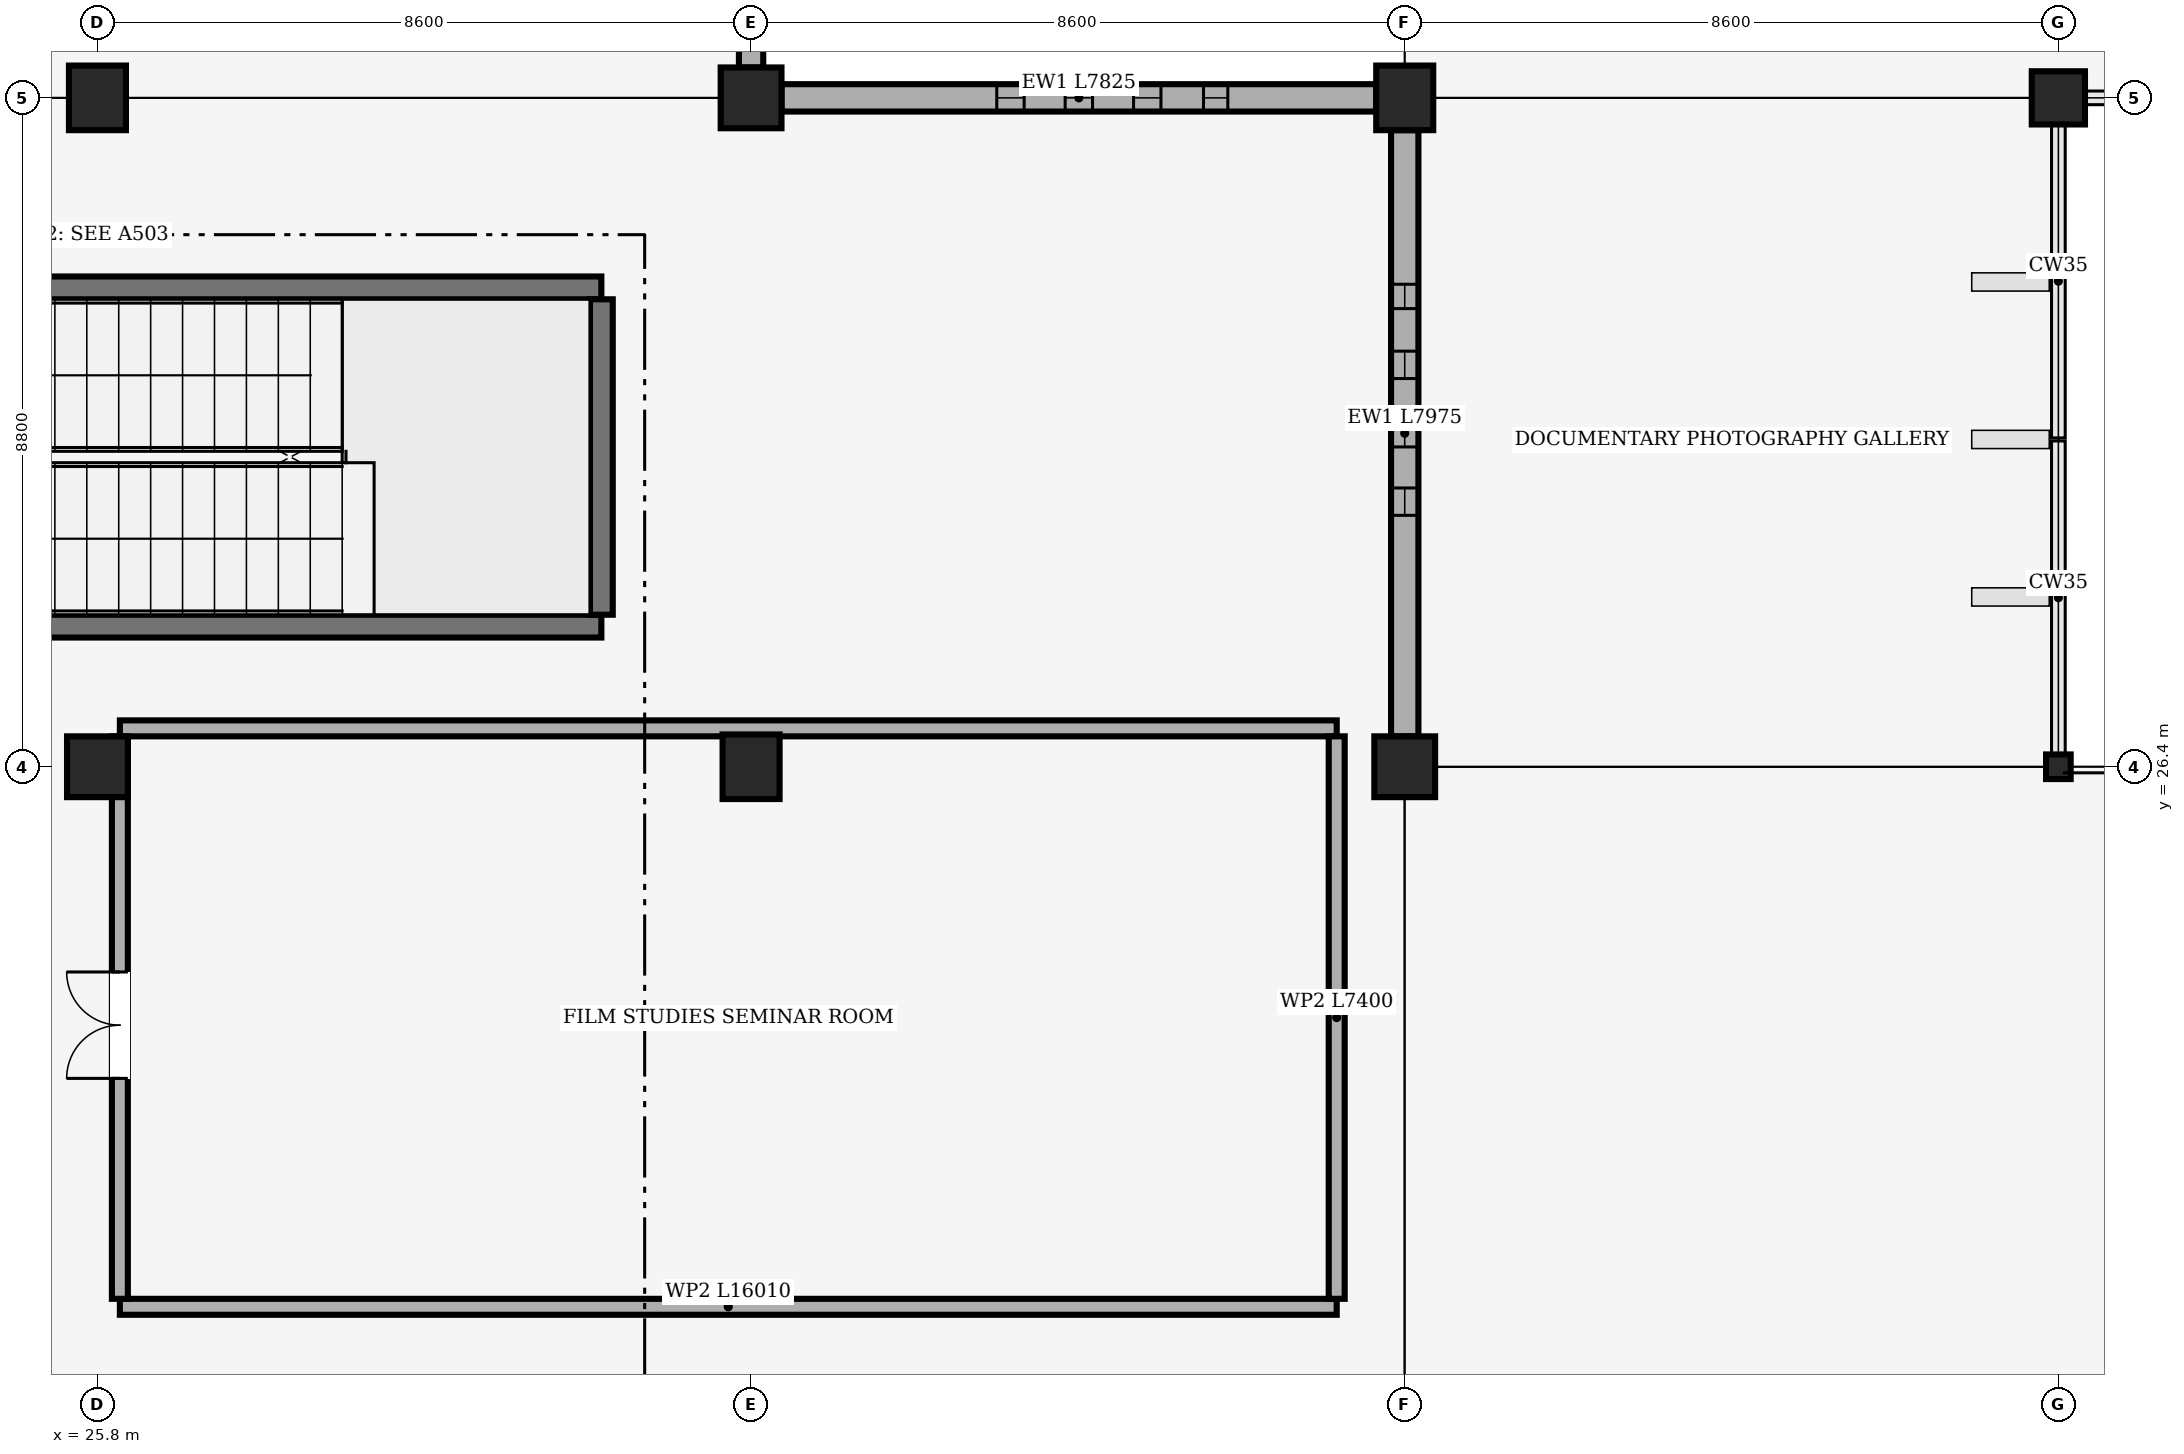
"""IFC4 building model, lengths in metres.
Left out: names, types, materials, properties, quantities, classifications, styles, units other than length and angle.
Written with IfcOpenShell. Run it as: python <this file> out.ifc"""

import sys

from ifc_helpers import new_model, si_unit, direction, frame, frame_2d, origin, origin_2d, place, context, subcontext, project, spatial, rectangle, hollow_circle, extrude, element, fill, save


model = new_model("IFC4")
c1 = context("Model", 3, precision=1e-05, world=origin(), true_north=direction((0.0, 1.0)))
c2 = subcontext(c1, "Body", "Model", "MODEL_VIEW")
j1 = project(units=[si_unit("LENGTHUNIT", "METRE"), si_unit("PLANEANGLEUNIT", "RADIAN")], contexts=[c1])
p1 = place(None, origin())
s1 = spatial("IfcSite", under=j1, at=p1, CompositionType="ELEMENT")
p2 = place(p1, origin())
s2 = spatial("IfcBuilding", under=s1, at=p2, CompositionType="ELEMENT")
p3 = place(p2, frame((0.0, 0.0, 8.4)))
s3 = spatial("IfcBuildingStorey", under=s2, at=p3, CompositionType="ELEMENT", Elevation=8.4)
p4 = place(p3, frame((25.8, 26.4, 0.0), z_axis=(0.0, 0.0, 1.0), x_axis=(1.0, 0.0, 0.0)))
e1 = element("IfcColumn", 1, at=p4, inside=s3, PredefinedType="COLUMN", context=c2, shape_type="SweptSolid", body=[
    extrude(rectangle(XDim=0.8, YDim=0.8, at=origin_2d()), origin(), (0.0, 0.0, 1.0), 3.34),
])
for number, where, z_axis, x_axis in (
    (2, (25.8, 35.2, 0.0), (0.0, 0.0, 1.0), (1.0, 0.0, 0.0)),
    (3, (34.4, 26.4, 0.0), (0.0, 0.0, 1.0), (1.0, 0.0, 0.0)),
):
    element("IfcColumn", number, at=place(p3, frame(where, z_axis=z_axis, x_axis=x_axis)), inside=s3, PredefinedType="COLUMN", context=c2, shape_type="SweptSolid", body=[
        extrude(rectangle(XDim=0.75, YDim=0.85, at=origin_2d()), origin(), (0.0, 0.0, 1.0), 3.34),
    ])
for number, where, z_axis, x_axis in (
    (4, (34.4, 35.2, 0.0), (0.0, 0.0, 1.0), (1.0, 0.0, 0.0)),
    (5, (43.0, 26.4, 0.0), (0.0, 0.0, 1.0), (1.0, 0.0, 0.0)),
):
    element("IfcColumn", number, at=place(p3, frame(where, z_axis=z_axis, x_axis=x_axis)), inside=s3, PredefinedType="COLUMN", context=c2, shape_type="SweptSolid", body=[
        extrude(rectangle(XDim=0.8, YDim=0.8, at=origin_2d()), origin(), (0.0, 0.0, 1.0), 3.34),
    ])
p5 = place(p3, frame((43.0, 35.2, 0.0), z_axis=(0.0, 0.0, 1.0), x_axis=(1.0, 0.0, 0.0)))
e6 = element("IfcColumn", 6, at=p5, inside=s3, PredefinedType="COLUMN", context=c2, shape_type="SweptSolid", body=[
    extrude(rectangle(XDim=0.75, YDim=0.85, at=origin_2d()), origin(), (0.0, 0.0, 1.0), 3.34),
])
p6 = place(p3, frame((51.6, 26.4, 0.0), z_axis=(0.0, 0.0, 1.0), x_axis=(1.0, 0.0, 0.0)))
e7 = element("IfcColumn", 7, at=p6, inside=s3, PredefinedType="COLUMN", context=c2, shape_type="SweptSolid", body=[
    extrude(hollow_circle(Radius=0.162, WallThickness=0.01, at=origin_2d()), origin(), (0.0, 0.0, 1.0), 3.34),
])
p7 = place(p3, frame((51.6, 35.2, 0.0), z_axis=(0.0, 0.0, 1.0), x_axis=(1.0, 0.0, 0.0)))
e8 = element("IfcColumn", 8, at=p7, inside=s3, PredefinedType="COLUMN", context=c2, shape_type="SweptSolid", body=[
    extrude(rectangle(XDim=0.7, YDim=0.7, at=origin_2d()), origin(), (0.0, 0.0, 1.0), 3.34),
])
p8 = place(p3, frame((43.0, 26.8, 0.0), z_axis=(0.0, 0.0, 1.0), x_axis=(0.0, 1.0, 0.0)))
e9 = element("IfcWall", 9, at=p8, inside=s3, PredefinedType="SOLIDWALL", context=c2, shape_type="SweptSolid", body=[
    extrude(rectangle(XDim=7.975, YDim=0.36, at=frame_2d((3.987, 0.0))), origin(), (0.0, 0.0, 1.0), 2.675),
])
p9 = place(p8, frame((2.907, 0.0, 1.32)))
e10 = element("IfcOpeningElement", 10, at=p9, cuts=e9, PredefinedType="OPENING", context=c2, shape_type="SweptSolid", body=[
    extrude(rectangle(XDim=0.36, YDim=0.36, at=frame_2d((0.18, 0.18))), frame((0.0, 0.18, 0.0), z_axis=(0.0, -1.0, 0.0), x_axis=(1.0, 0.0, 0.0)), (0.0, 0.0, 1.0), 0.36),
])
p10 = place(p8, frame((3.808, 0.0, 0.42)))
e11 = element("IfcOpeningElement", 11, at=p10, cuts=e9, PredefinedType="OPENING", context=c2, shape_type="SweptSolid", body=[
    extrude(rectangle(XDim=0.36, YDim=0.36, at=frame_2d((0.18, 0.18))), frame((0.0, 0.18, 0.0), z_axis=(0.0, -1.0, 0.0), x_axis=(1.0, 0.0, 0.0)), (0.0, 0.0, 1.0), 0.36),
])
p11 = place(p8, frame((4.708, 0.0, 1.32)))
e12 = element("IfcOpeningElement", 12, at=p11, cuts=e9, PredefinedType="OPENING", context=c2, shape_type="SweptSolid", body=[
    extrude(rectangle(XDim=0.36, YDim=0.36, at=frame_2d((0.18, 0.18))), frame((0.0, 0.18, 0.0), z_axis=(0.0, -1.0, 0.0), x_axis=(1.0, 0.0, 0.0)), (0.0, 0.0, 1.0), 0.36),
])
p12 = place(p8, frame((5.627, 0.0, 1.32)))
e13 = element("IfcOpeningElement", 13, at=p12, cuts=e9, PredefinedType="OPENING", context=c2, shape_type="SweptSolid", body=[
    extrude(rectangle(XDim=0.32, YDim=0.32, at=frame_2d((0.16, 0.16))), frame((0.0, 0.18, 0.0), z_axis=(0.0, -1.0, 0.0), x_axis=(1.0, 0.0, 0.0)), (0.0, 0.0, 1.0), 0.36),
])
p13 = place(p3, frame((34.8, 35.2, 0.0), z_axis=(0.0, 0.0, 1.0), x_axis=(1.0, 0.0, 0.0)))
e14 = element("IfcWall", 14, at=p13, inside=s3, PredefinedType="SOLIDWALL", context=c2, shape_type="SweptSolid", body=[
    extrude(rectangle(XDim=7.825, YDim=0.36, at=frame_2d((3.913, 0.0))), origin(), (0.0, 0.0, 1.0), 2.675),
])
p14 = place(p13, frame((2.833, 0.0, 1.32)))
e15 = element("IfcOpeningElement", 15, at=p14, cuts=e14, PredefinedType="OPENING", context=c2, shape_type="SweptSolid", body=[
    extrude(rectangle(XDim=0.36, YDim=0.36, at=frame_2d((0.18, 0.18))), frame((0.0, 0.18, 0.0), z_axis=(0.0, -1.0, 0.0), x_axis=(1.0, 0.0, 0.0)), (0.0, 0.0, 1.0), 0.36),
])
p15 = place(p13, frame((3.732, 0.0, 0.42)))
e16 = element("IfcOpeningElement", 16, at=p15, cuts=e14, PredefinedType="OPENING", context=c2, shape_type="SweptSolid", body=[
    extrude(rectangle(XDim=0.36, YDim=0.36, at=frame_2d((0.18, 0.18))), frame((0.0, 0.18, 0.0), z_axis=(0.0, -1.0, 0.0), x_axis=(1.0, 0.0, 0.0)), (0.0, 0.0, 1.0), 0.36),
])
p16 = place(p13, frame((4.633, 0.0, 1.32)))
e17 = element("IfcOpeningElement", 17, at=p16, cuts=e14, PredefinedType="OPENING", context=c2, shape_type="SweptSolid", body=[
    extrude(rectangle(XDim=0.36, YDim=0.36, at=frame_2d((0.18, 0.18))), frame((0.0, 0.18, 0.0), z_axis=(0.0, -1.0, 0.0), x_axis=(1.0, 0.0, 0.0)), (0.0, 0.0, 1.0), 0.36),
])
p17 = place(p13, frame((5.552, 0.0, 1.32)))
e18 = element("IfcOpeningElement", 18, at=p17, cuts=e14, PredefinedType="OPENING", context=c2, shape_type="SweptSolid", body=[
    extrude(rectangle(XDim=0.32, YDim=0.32, at=frame_2d((0.16, 0.16))), frame((0.0, 0.18, 0.0), z_axis=(0.0, -1.0, 0.0), x_axis=(1.0, 0.0, 0.0)), (0.0, 0.0, 1.0), 0.36),
])
p18 = place(p3, frame((34.4, 35.6, 0.0), z_axis=(0.0, 0.0, 1.0), x_axis=(0.0, 1.0, 0.0)))
e19 = element("IfcWall", 19, at=p18, inside=s3, PredefinedType="SOLIDWALL", context=c2, shape_type="SweptSolid", body=[
    extrude(rectangle(XDim=8.025, YDim=0.32, at=frame_2d((4.012, 0.0))), origin(), (0.0, 0.0, 1.0), 2.675),
])
for number, where, z_axis, x_axis in (
    (20, (32.43, 28.25, 0.0), (0.0, 0.0, 1.0), (-1.0, 0.0, 0.0)),
    (21, (22.25, 32.7, 0.0), (0.0, 0.0, 1.0), (1.0, 0.0, 0.0)),
):
    element("IfcWall", number, at=place(p3, frame(where, z_axis=z_axis, x_axis=x_axis)), inside=s3, PredefinedType="SHEAR", context=c2, shape_type="SweptSolid", body=[
        extrude(rectangle(XDim=10.18, YDim=0.3, at=frame_2d((5.09, 0.0))), origin(), (0.0, 0.0, 1.0), 3.34),
    ])
p19 = place(p3, frame((32.43, 32.55, 0.0), z_axis=(0.0, 0.0, 1.0), x_axis=(0.0, -1.0, 0.0)))
e22 = element("IfcWall", 22, at=p19, inside=s3, PredefinedType="SHEAR", context=c2, shape_type="SweptSolid", body=[
    extrude(rectangle(XDim=4.15, YDim=0.3, at=frame_2d((2.075, 0.0))), origin(), (0.0, 0.0, 1.0), 3.34),
])
p20 = place(p3, frame((42.105, 19.295, 0.0), z_axis=(0.0, 0.0, 1.0), x_axis=(-1.0, 0.0, 0.0)))
e23 = element("IfcWall", 23, at=p20, inside=s3, PredefinedType="PARTITIONING", context=c2, shape_type="SweptSolid", body=[
    extrude(rectangle(XDim=16.01, YDim=0.21, at=frame_2d((8.005, 0.0))), origin(), (0.0, 0.0, 1.0), 3.32),
])
p21 = place(p3, frame((26.095, 19.4, 0.0), z_axis=(0.0, 0.0, 1.0), x_axis=(0.0, 1.0, 0.0)))
e24 = element("IfcWall", 24, at=p21, inside=s3, PredefinedType="PARTITIONING", context=c2, shape_type="SweptSolid", body=[
    extrude(rectangle(XDim=7.4, YDim=0.21, at=frame_2d((3.7, 0.0))), origin(), (0.0, 0.0, 1.0), 2.67),
])
p22 = place(p21, frame((2.9, 0.0, 0.0)))
e25 = element("IfcOpeningElement", 25, at=p22, cuts=e24, PredefinedType="OPENING", context=c2, shape_type="SweptSolid", body=[
    extrude(rectangle(XDim=1.4, YDim=2.15, at=frame_2d((0.7, 1.075))), frame((0.0, 0.105, 0.0), z_axis=(0.0, -1.0, 0.0), x_axis=(1.0, 0.0, 0.0)), (0.0, 0.0, 1.0), 0.21),
])
p23 = place(p3, frame((26.095, 26.905, 0.0), z_axis=(0.0, 0.0, 1.0), x_axis=(1.0, 0.0, 0.0)))
e26 = element("IfcWall", 26, at=p23, inside=s3, PredefinedType="PARTITIONING", context=c2, shape_type="SweptSolid", body=[
    extrude(rectangle(XDim=16.01, YDim=0.21, at=frame_2d((8.005, 0.0))), origin(), (0.0, 0.0, 1.0), 3.32),
])
p24 = place(p3, frame((42.105, 26.8, 0.0), z_axis=(0.0, 0.0, 1.0), x_axis=(0.0, -1.0, 0.0)))
e27 = element("IfcWall", 27, at=p24, inside=s3, PredefinedType="PARTITIONING", context=c2, shape_type="SweptSolid", body=[
    extrude(rectangle(XDim=7.4, YDim=0.21, at=frame_2d((3.7, 0.0))), origin(), (0.0, 0.0, 1.0), 3.32),
])
p25 = place(p9, origin())
e28 = element("IfcWindow", 28, at=p25, inside=s3, PartitioningType="SINGLE_PANEL", PredefinedType="WINDOW", context=c2, shape_type="SweptSolid", body=[
    extrude(rectangle(XDim=0.36, YDim=0.36, at=frame_2d((0.18, 0.18))), frame((0.0, -0.07, 0.0), z_axis=(0.0, -1.0, 0.0), x_axis=(1.0, 0.0, 0.0)), (0.0, 0.0, 1.0), 0.06),
])
fill(e10, e28)
p26 = place(p10, origin())
e29 = element("IfcWindow", 29, at=p26, inside=s3, PartitioningType="SINGLE_PANEL", PredefinedType="WINDOW", context=c2, shape_type="SweptSolid", body=[
    extrude(rectangle(XDim=0.36, YDim=0.36, at=frame_2d((0.18, 0.18))), frame((0.0, -0.07, 0.0), z_axis=(0.0, -1.0, 0.0), x_axis=(1.0, 0.0, 0.0)), (0.0, 0.0, 1.0), 0.06),
])
fill(e11, e29)
p27 = place(p11, origin())
e30 = element("IfcWindow", 30, at=p27, inside=s3, PartitioningType="SINGLE_PANEL", PredefinedType="WINDOW", context=c2, shape_type="SweptSolid", body=[
    extrude(rectangle(XDim=0.36, YDim=0.36, at=frame_2d((0.18, 0.18))), frame((0.0, -0.07, 0.0), z_axis=(0.0, -1.0, 0.0), x_axis=(1.0, 0.0, 0.0)), (0.0, 0.0, 1.0), 0.06),
])
fill(e12, e30)
p28 = place(p12, origin())
e31 = element("IfcWindow", 31, at=p28, inside=s3, PartitioningType="SINGLE_PANEL", PredefinedType="WINDOW", context=c2, shape_type="SweptSolid", body=[
    extrude(rectangle(XDim=0.32, YDim=0.32, at=frame_2d((0.16, 0.16))), frame((0.0, -0.07, 0.0), z_axis=(0.0, -1.0, 0.0), x_axis=(1.0, 0.0, 0.0)), (0.0, 0.0, 1.0), 0.06),
])
fill(e13, e31)
p29 = place(p14, origin())
e32 = element("IfcWindow", 32, at=p29, inside=s3, PartitioningType="SINGLE_PANEL", PredefinedType="WINDOW", context=c2, shape_type="SweptSolid", body=[
    extrude(rectangle(XDim=0.36, YDim=0.36, at=frame_2d((0.18, 0.18))), frame((0.0, -0.07, 0.0), z_axis=(0.0, -1.0, 0.0), x_axis=(1.0, 0.0, 0.0)), (0.0, 0.0, 1.0), 0.06),
])
fill(e15, e32)
p30 = place(p15, origin())
e33 = element("IfcWindow", 33, at=p30, inside=s3, PartitioningType="SINGLE_PANEL", PredefinedType="WINDOW", context=c2, shape_type="SweptSolid", body=[
    extrude(rectangle(XDim=0.36, YDim=0.36, at=frame_2d((0.18, 0.18))), frame((0.0, -0.07, 0.0), z_axis=(0.0, -1.0, 0.0), x_axis=(1.0, 0.0, 0.0)), (0.0, 0.0, 1.0), 0.06),
])
fill(e16, e33)
p31 = place(p16, origin())
e34 = element("IfcWindow", 34, at=p31, inside=s3, PartitioningType="SINGLE_PANEL", PredefinedType="WINDOW", context=c2, shape_type="SweptSolid", body=[
    extrude(rectangle(XDim=0.36, YDim=0.36, at=frame_2d((0.18, 0.18))), frame((0.0, -0.07, 0.0), z_axis=(0.0, -1.0, 0.0), x_axis=(1.0, 0.0, 0.0)), (0.0, 0.0, 1.0), 0.06),
])
fill(e17, e34)
p32 = place(p17, origin())
e35 = element("IfcWindow", 35, at=p32, inside=s3, PartitioningType="SINGLE_PANEL", PredefinedType="WINDOW", context=c2, shape_type="SweptSolid", body=[
    extrude(rectangle(XDim=0.32, YDim=0.32, at=frame_2d((0.16, 0.16))), frame((0.0, -0.07, 0.0), z_axis=(0.0, -1.0, 0.0), x_axis=(1.0, 0.0, 0.0)), (0.0, 0.0, 1.0), 0.06),
])
fill(e18, e35)
p33 = place(p22, origin())
e36 = element("IfcDoor", 36, at=p33, inside=s3, OperationType="DOUBLE_DOOR_SINGLE_SWING", PredefinedType="DOOR", context=c2, shape_type="SweptSolid", body=[
    extrude(rectangle(XDim=1.4, YDim=2.15, at=frame_2d((0.7, 1.075))), frame((0.0, 0.025, 0.0), z_axis=(0.0, -1.0, 0.0), x_axis=(1.0, 0.0, 0.0)), (0.0, 0.0, 1.0), 0.05),
])
fill(e25, e36)
save(model, sys.argv[1])
